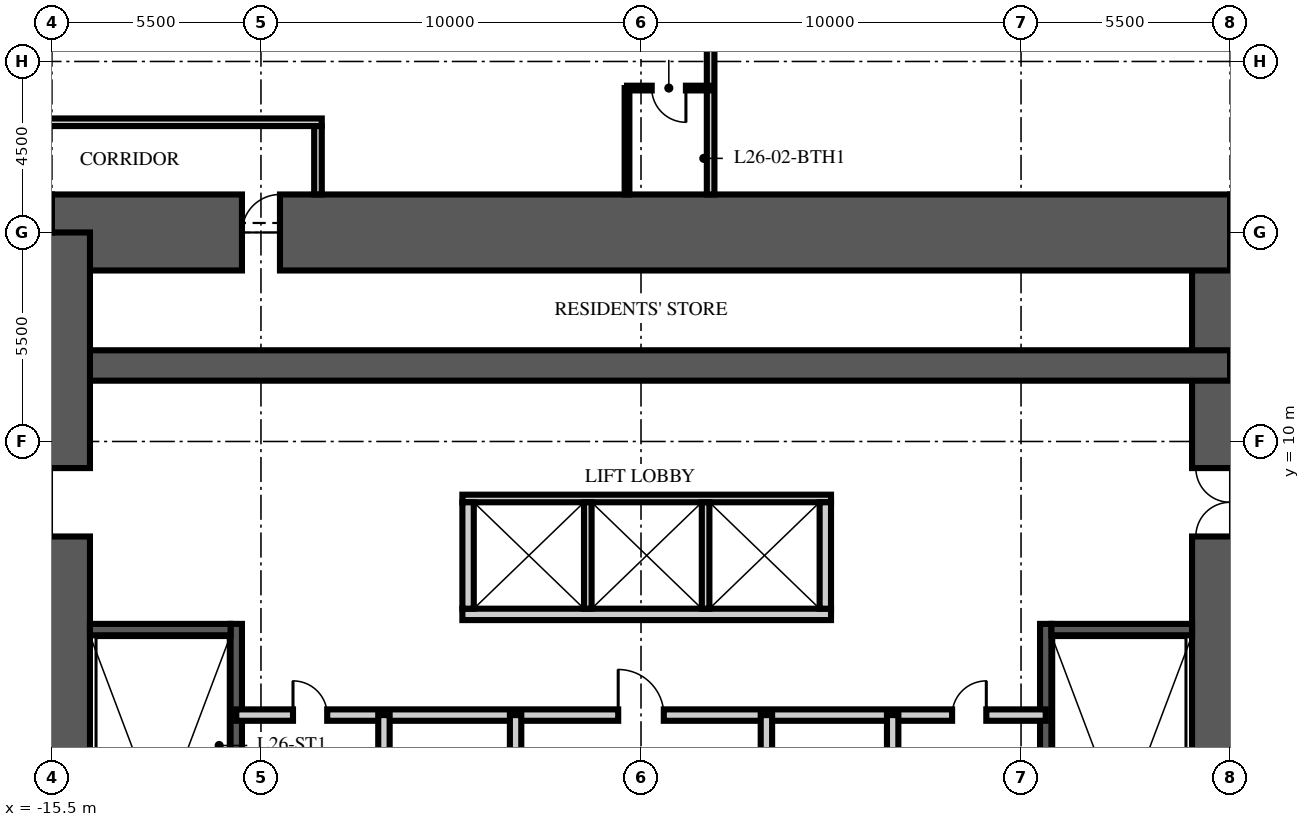
"""IFC4 building model, lengths in metres.
Left out: names, types, materials, properties, quantities, classifications, styles, units other than length and angle.
Written with IfcOpenShell. Run it as: python <this file> out.ifc"""

import sys

from ifc_helpers import new_model, si_unit, direction, frame, frame_2d, origin, place, context, subcontext, project, spatial, rectangle, extrude, element, fill, save


model = new_model("IFC4")
c1 = context("Model", 3, precision=1e-05, world=origin(), true_north=direction((0.0, 1.0)))
c2 = subcontext(c1, "Body", "Model", "MODEL_VIEW")
j1 = project(units=[si_unit("LENGTHUNIT", "METRE"), si_unit("PLANEANGLEUNIT", "RADIAN")], contexts=[c1])
p1 = place(None, origin())
s1 = spatial("IfcSite", under=j1, at=p1, CompositionType="ELEMENT")
p2 = place(p1, origin())
s2 = spatial("IfcBuilding", under=s1, at=p2, CompositionType="ELEMENT")
p3 = place(p2, frame((0.0, 0.0, 107.25)))
s3 = spatial("IfcBuildingStorey", under=s2, at=p3, CompositionType="ELEMENT", Elevation=107.25)
p4 = place(p3, frame((15.5, -15.5, -0.25), z_axis=(0.0, 0.0, 1.0), x_axis=(0.0, 1.0, 0.0)))
e1 = element("IfcWall", 1, at=p4, inside=s3, PredefinedType="SHEAR", context=c2, shape_type="SweptSolid", body=[
    extrude(rectangle(XDim=31.0, YDim=2.0, at=frame_2d((15.5, 0.0))), origin(), (0.0, 0.0, 1.0), 3.75),
])
p5 = place(p4, frame((6.5, 0.0, 0.25)))
e2 = element("IfcOpeningElement", 2, at=p5, cuts=e1, PredefinedType="OPENING", context=c2, shape_type="SweptSolid", body=[
    extrude(rectangle(XDim=1.2, YDim=2.1, at=frame_2d((0.6, 1.05))), frame((0.0, 1.01, 0.0), z_axis=(0.0, -1.0, 0.0), x_axis=(1.0, 0.0, 0.0)), (0.0, 0.0, 1.0), 2.02),
])
p6 = place(p4, frame((23.0, 0.0, 0.25)))
e3 = element("IfcOpeningElement", 3, at=p6, cuts=e1, PredefinedType="OPENING", context=c2, shape_type="SweptSolid", body=[
    extrude(rectangle(XDim=1.8, YDim=2.1, at=frame_2d((0.9, 1.05))), frame((0.0, 1.01, 0.0), z_axis=(0.0, -1.0, 0.0), x_axis=(1.0, 0.0, 0.0)), (0.0, 0.0, 1.0), 2.02),
])
p7 = place(p3, frame((-15.5, 15.5, -0.25), z_axis=(0.0, 0.0, 1.0), x_axis=(1.0, 0.0, 0.0)))
e4 = element("IfcWall", 4, at=p7, inside=s3, PredefinedType="SHEAR", context=c2, shape_type="SweptSolid", body=[
    extrude(rectangle(XDim=31.0, YDim=2.0, at=frame_2d((15.5, 0.0))), origin(), (0.0, 0.0, 1.0), 3.75),
])
p8 = place(p7, frame((5.0, 0.0, 0.25)))
e5 = element("IfcOpeningElement", 5, at=p8, cuts=e4, PredefinedType="OPENING", context=c2, shape_type="SweptSolid", body=[
    extrude(rectangle(XDim=1.0, YDim=2.1, at=frame_2d((0.5, 1.05))), frame((0.0, 1.01, 0.0), z_axis=(0.0, -1.0, 0.0), x_axis=(1.0, 0.0, 0.0)), (0.0, 0.0, 1.0), 2.02),
])
p9 = place(p3, frame((-15.5, 12.0, -0.25), z_axis=(0.0, 0.0, 1.0), x_axis=(1.0, 0.0, 0.0)))
e6 = element("IfcWall", 6, at=p9, inside=s3, PredefinedType="SHEAR", context=c2, shape_type="SweptSolid", body=[
    extrude(rectangle(XDim=31.0, YDim=0.8, at=frame_2d((15.5, 0.0))), origin(), (0.0, 0.0, 1.0), 3.75),
])
p10 = place(p3, frame((-15.5, -15.5, -0.25), z_axis=(0.0, 0.0, 1.0), x_axis=(0.0, 1.0, 0.0)))
e7 = element("IfcWall", 7, at=p10, inside=s3, PredefinedType="SHEAR", context=c2, shape_type="SweptSolid", body=[
    extrude(rectangle(XDim=31.0, YDim=2.0, at=frame_2d((15.5, 0.0))), origin(), (0.0, 0.0, 1.0), 3.75),
])
p11 = place(p10, frame((6.5, 0.0, 0.25)))
e8 = element("IfcOpeningElement", 8, at=p11, cuts=e7, PredefinedType="OPENING", context=c2, shape_type="SweptSolid", body=[
    extrude(rectangle(XDim=1.2, YDim=2.1, at=frame_2d((0.6, 1.05))), frame((0.0, 1.01, 0.0), z_axis=(0.0, -1.0, 0.0), x_axis=(1.0, 0.0, 0.0)), (0.0, 0.0, 1.0), 2.02),
])
p12 = place(p10, frame((23.0, 0.0, 0.25)))
e9 = element("IfcOpeningElement", 9, at=p12, cuts=e7, PredefinedType="OPENING", context=c2, shape_type="SweptSolid", body=[
    extrude(rectangle(XDim=1.8, YDim=2.1, at=frame_2d((0.9, 1.05))), frame((0.0, 1.01, 0.0), z_axis=(0.0, -1.0, 0.0), x_axis=(1.0, 0.0, 0.0)), (0.0, 0.0, 1.0), 2.02),
])
p13 = place(p3, frame((-10.65, -4.9, 0.0), z_axis=(0.0, 0.0, 1.0), x_axis=(0.0, 1.0, 0.0)))
e10 = element("IfcWall", 10, at=p13, inside=s3, PredefinedType="SOLIDWALL", context=c2, shape_type="SweptSolid", body=[
    extrude(rectangle(XDim=10.1, YDim=0.3, at=frame_2d((5.05, 0.0))), origin(), (0.0, 0.0, 1.0), 3.5),
])
p14 = place(p3, frame((-14.5, 5.05, 0.0), z_axis=(0.0, 0.0, 1.0), x_axis=(1.0, 0.0, 0.0)))
e11 = element("IfcWall", 11, at=p14, inside=s3, PredefinedType="SOLIDWALL", context=c2, shape_type="SweptSolid", body=[
    extrude(rectangle(XDim=3.7, YDim=0.3, at=frame_2d((1.85, 0.0))), origin(), (0.0, 0.0, 1.0), 3.5),
])
p15 = place(p3, frame((10.65, -4.9, 0.0), z_axis=(0.0, 0.0, 1.0), x_axis=(0.0, 1.0, 0.0)))
e12 = element("IfcWall", 12, at=p15, inside=s3, PredefinedType="SOLIDWALL", context=c2, shape_type="SweptSolid", body=[
    extrude(rectangle(XDim=10.1, YDim=0.3, at=frame_2d((5.05, 0.0))), origin(), (0.0, 0.0, 1.0), 3.5),
])
p16 = place(p3, frame((14.5, 5.05, 0.0), z_axis=(0.0, 0.0, 1.0), x_axis=(-1.0, 0.0, 0.0)))
e13 = element("IfcWall", 13, at=p16, inside=s3, PredefinedType="SOLIDWALL", context=c2, shape_type="SweptSolid", body=[
    extrude(rectangle(XDim=3.7, YDim=0.3, at=frame_2d((1.85, 0.0))), origin(), (0.0, 0.0, 1.0), 3.5),
])
p17 = place(p3, frame((-4.7, 5.45, 0.0), z_axis=(0.0, 0.0, 1.0), x_axis=(1.0, 0.0, 0.0)))
e14 = element("IfcWall", 14, at=p17, inside=s3, PredefinedType="PARTITIONING", context=c2, shape_type="SweptSolid", body=[
    extrude(rectangle(XDim=9.7, YDim=0.3, at=frame_2d((4.85, 0.0))), origin(), (0.0, 0.0, 1.0), 3.5),
])
p18 = place(p3, frame((-4.7, 8.5, 0.0), z_axis=(0.0, 0.0, 1.0), x_axis=(1.0, 0.0, 0.0)))
e15 = element("IfcWall", 15, at=p18, inside=s3, PredefinedType="PARTITIONING", context=c2, shape_type="SweptSolid", body=[
    extrude(rectangle(XDim=9.7, YDim=0.2, at=frame_2d((4.85, 0.0))), origin(), (0.0, 0.0, 1.0), 3.5),
])
for number, where, z_axis, x_axis in (
    (16, (-4.55, 5.6, 0.0), (0.0, 0.0, 1.0), (0.0, 1.0, 0.0)),
    (17, (4.85, 5.6, 0.0), (0.0, 0.0, 1.0), (0.0, 1.0, 0.0)),
):
    element("IfcWall", number, at=place(p3, frame(where, z_axis=z_axis, x_axis=x_axis)), inside=s3, PredefinedType="PARTITIONING", context=c2, shape_type="SweptSolid", body=[
        extrude(rectangle(XDim=2.8, YDim=0.3, at=frame_2d((1.4, 0.0))), origin(), (0.0, 0.0, 1.0), 3.5),
    ])
for number, where, z_axis, x_axis in (
    (18, (-1.4, 5.6, 0.0), (0.0, 0.0, 1.0), (0.0, 1.0, 0.0)),
    (19, (1.7, 5.6, 0.0), (0.0, 0.0, 1.0), (0.0, 1.0, 0.0)),
):
    element("IfcWall", number, at=place(p3, frame(where, z_axis=z_axis, x_axis=x_axis)), inside=s3, PredefinedType="PARTITIONING", context=c2, shape_type="SweptSolid", body=[
        extrude(rectangle(XDim=2.8, YDim=0.2, at=frame_2d((1.4, 0.0))), origin(), (0.0, 0.0, 1.0), 3.5),
    ])
p19 = place(p3, frame((-10.65, 2.8, 0.0), z_axis=(0.0, 0.0, 1.0), x_axis=(1.0, 0.0, 0.0)))
e20 = element("IfcWall", 20, at=p19, inside=s3, PredefinedType="PARTITIONING", context=c2, shape_type="SweptSolid", body=[
    extrude(rectangle(XDim=21.3, YDim=0.3, at=frame_2d((10.65, 0.0))), origin(), (0.0, 0.0, 1.0), 3.5),
])
p20 = place(p19, frame((10.05, 0.0, 0.0)))
e21 = element("IfcOpeningElement", 21, at=p20, cuts=e20, PredefinedType="OPENING", context=c2, shape_type="SweptSolid", body=[
    extrude(rectangle(XDim=1.2, YDim=2.1, at=frame_2d((0.6, 1.05))), frame((0.0, 0.16, 0.0), z_axis=(0.0, -1.0, 0.0), x_axis=(1.0, 0.0, 0.0)), (0.0, 0.0, 1.0), 0.32),
])
p21 = place(p19, frame((1.493, 0.0, 0.0)))
e22 = element("IfcOpeningElement", 22, at=p21, cuts=e20, PredefinedType="OPENING", context=c2, shape_type="SweptSolid", body=[
    extrude(rectangle(XDim=0.9, YDim=2.1, at=frame_2d((0.45, 1.05))), frame((0.0, 0.16, 0.0), z_axis=(0.0, -1.0, 0.0), x_axis=(1.0, 0.0, 0.0)), (0.0, 0.0, 1.0), 0.32),
])
p22 = place(p19, frame((18.836, 0.0, 0.0)))
e23 = element("IfcOpeningElement", 23, at=p22, cuts=e20, PredefinedType="OPENING", context=c2, shape_type="SweptSolid", body=[
    extrude(rectangle(XDim=0.9, YDim=2.1, at=frame_2d((0.45, 1.05))), frame((0.0, 0.16, 0.0), z_axis=(0.0, -1.0, 0.0), x_axis=(1.0, 0.0, 0.0)), (0.0, 0.0, 1.0), 0.32),
])
p23 = place(p3, frame((-3.3, -6.65, 0.0), z_axis=(0.0, 0.0, 1.0), x_axis=(0.0, 1.0, 0.0)))
e24 = element("IfcWall", 24, at=p23, inside=s3, PredefinedType="PARTITIONING", context=c2, shape_type="SweptSolid", body=[
    extrude(rectangle(XDim=9.45, YDim=0.3, at=frame_2d((4.725, 0.0))), origin(), (0.0, 0.0, 1.0), 3.5),
])
p24 = place(p23, frame((4.275, 0.0, 0.0)))
e25 = element("IfcOpeningElement", 25, at=p24, cuts=e24, PredefinedType="OPENING", context=c2, shape_type="SweptSolid", body=[
    extrude(rectangle(XDim=0.9, YDim=2.1, at=frame_2d((0.45, 1.05))), frame((0.0, 0.16, 0.0), z_axis=(0.0, -1.0, 0.0), x_axis=(1.0, 0.0, 0.0)), (0.0, 0.0, 1.0), 0.32),
])
p25 = place(p3, frame((3.3, -6.65, 0.0), z_axis=(0.0, 0.0, 1.0), x_axis=(0.0, 1.0, 0.0)))
e26 = element("IfcWall", 26, at=p25, inside=s3, PredefinedType="PARTITIONING", context=c2, shape_type="SweptSolid", body=[
    extrude(rectangle(XDim=9.45, YDim=0.3, at=frame_2d((4.725, 0.0))), origin(), (0.0, 0.0, 1.0), 3.5),
])
p26 = place(p25, frame((4.275, 0.0, 0.0)))
e27 = element("IfcOpeningElement", 27, at=p26, cuts=e26, PredefinedType="OPENING", context=c2, shape_type="SweptSolid", body=[
    extrude(rectangle(XDim=0.9, YDim=2.1, at=frame_2d((0.45, 1.05))), frame((0.0, 0.16, 0.0), z_axis=(0.0, -1.0, 0.0), x_axis=(1.0, 0.0, 0.0)), (0.0, 0.0, 1.0), 0.32),
])
for number, where, z_axis, x_axis in (
    (28, (-6.764, -6.65, 0.0), (0.0, 0.0, 1.0), (0.0, 1.0, 0.0)),
    (29, (6.622, -6.65, 0.0), (0.0, 0.0, 1.0), (0.0, 1.0, 0.0)),
):
    element("IfcWall", number, at=place(p3, frame(where, z_axis=z_axis, x_axis=x_axis)), inside=s3, PredefinedType="PARTITIONING", context=c2, shape_type="SweptSolid", body=[
        extrude(rectangle(XDim=9.45, YDim=0.3, at=frame_2d((4.725, 0.0))), origin(), (0.0, 0.0, 1.0), 3.5),
    ])
p27 = place(p3, frame((-18.5, 18.4, 0.0), z_axis=(0.0, 0.0, 1.0), x_axis=(1.0, 0.0, 0.0)))
e30 = element("IfcWall", 30, at=p27, inside=s3, PredefinedType="PARTITIONING", context=c2, shape_type="SweptSolid", body=[
    extrude(rectangle(XDim=10.1, YDim=0.2, at=frame_2d((5.05, 0.0))), origin(), (0.0, 0.0, 1.0), 2.3),
])
p28 = place(p3, frame((-8.5, 18.3, 0.0), z_axis=(0.0, 0.0, 1.0), x_axis=(0.0, -1.0, 0.0)))
e31 = element("IfcWall", 31, at=p28, inside=s3, PredefinedType="PARTITIONING", context=c2, shape_type="SweptSolid", body=[
    extrude(rectangle(XDim=1.8, YDim=0.2, at=frame_2d((0.9, 0.0))), origin(), (0.0, 0.0, 1.0), 3.5),
])
p29 = place(p3, frame((1.832, 16.5, 0.0), z_axis=(0.0, 0.0, 1.0), x_axis=(0.0, 1.0, 0.0)))
e32 = element("IfcWall", 32, at=p29, inside=s3, PredefinedType="PARTITIONING", context=c2, shape_type="SweptSolid", body=[
    extrude(rectangle(XDim=12.65, YDim=0.2, at=frame_2d((6.325, 0.0))), origin(), (0.0, 0.0, 1.0), 2.81),
])
p30 = place(p3, frame((1.832, 19.3, 0.0), z_axis=(0.0, 0.0, 1.0), x_axis=(-1.0, 0.0, 0.0)))
e33 = element("IfcWall", 33, at=p30, inside=s3, PredefinedType="PARTITIONING", context=c2, shape_type="SweptSolid", body=[
    extrude(rectangle(XDim=2.2, YDim=0.125, at=frame_2d((1.1, 0.0))), origin(), (0.0, 0.0, 1.0), 2.7),
])
p31 = place(p30, frame((0.65, 0.0, 0.0)))
e34 = element("IfcOpeningElement", 34, at=p31, cuts=e33, PredefinedType="OPENING", context=c2, shape_type="SweptSolid", body=[
    extrude(rectangle(XDim=0.9, YDim=2.1, at=frame_2d((0.45, 1.05))), frame((0.0, 0.073, 0.0), z_axis=(0.0, -1.0, 0.0), x_axis=(1.0, 0.0, 0.0)), (0.0, 0.0, 1.0), 0.145),
])
p32 = place(p3, frame((-0.368, 16.5, 0.0), z_axis=(0.0, 0.0, 1.0), x_axis=(0.0, 1.0, 0.0)))
e35 = element("IfcWall", 35, at=p32, inside=s3, PredefinedType="PARTITIONING", context=c2, shape_type="SweptSolid", body=[
    extrude(rectangle(XDim=2.8, YDim=0.125, at=frame_2d((1.4, 0.0))), origin(), (0.0, 0.0, 1.0), 3.5),
])
p33 = place(p12, origin())
e36 = element("IfcDoor", 36, at=p33, inside=s3, OperationType="DOUBLE_DOOR_SINGLE_SWING", PredefinedType="DOOR", context=c2, shape_type="SweptSolid", body=[
    extrude(rectangle(XDim=1.8, YDim=2.1, at=frame_2d((0.9, 1.05))), frame((0.0, 0.025, 0.0), z_axis=(0.0, -1.0, 0.0), x_axis=(1.0, 0.0, 0.0)), (0.0, 0.0, 1.0), 0.05),
])
fill(e9, e36)
p34 = place(p6, origin())
e37 = element("IfcDoor", 37, at=p34, inside=s3, OperationType="DOUBLE_DOOR_SINGLE_SWING", PredefinedType="DOOR", context=c2, shape_type="SweptSolid", body=[
    extrude(rectangle(XDim=1.8, YDim=2.1, at=frame_2d((0.9, 1.05))), frame((0.0, 0.025, 0.0), z_axis=(0.0, -1.0, 0.0), x_axis=(1.0, 0.0, 0.0)), (0.0, 0.0, 1.0), 0.05),
])
fill(e3, e37)
p35 = place(p20, origin())
e38 = element("IfcDoor", 38, at=p35, inside=s3, OperationType="SINGLE_SWING_LEFT", PredefinedType="DOOR", context=c2, shape_type="SweptSolid", body=[
    extrude(rectangle(XDim=1.2, YDim=2.1, at=frame_2d((0.6, 1.05))), frame((0.0, 0.025, 0.0), z_axis=(0.0, -1.0, 0.0), x_axis=(1.0, 0.0, 0.0)), (0.0, 0.0, 1.0), 0.05),
])
fill(e21, e38)
p36 = place(p21, origin())
e39 = element("IfcDoor", 39, at=p36, inside=s3, OperationType="SINGLE_SWING_LEFT", PredefinedType="DOOR", context=c2, shape_type="SweptSolid", body=[
    extrude(rectangle(XDim=0.9, YDim=2.1, at=frame_2d((0.45, 1.05))), frame((0.0, 0.025, 0.0), z_axis=(0.0, -1.0, 0.0), x_axis=(1.0, 0.0, 0.0)), (0.0, 0.0, 1.0), 0.05),
])
fill(e22, e39)
p37 = place(p22, origin())
e40 = element("IfcDoor", 40, at=p37, inside=s3, OperationType="SINGLE_SWING_RIGHT", PredefinedType="DOOR", context=c2, shape_type="SweptSolid", body=[
    extrude(rectangle(XDim=0.9, YDim=2.1, at=frame_2d((0.45, 1.05))), frame((0.0, 0.025, 0.0), z_axis=(0.0, -1.0, 0.0), x_axis=(1.0, 0.0, 0.0)), (0.0, 0.0, 1.0), 0.05),
])
fill(e23, e40)
p38 = place(p8, origin())
e41 = element("IfcDoor", 41, at=p38, inside=s3, OperationType="SINGLE_SWING_RIGHT", PredefinedType="DOOR", context=c2, shape_type="SweptSolid", body=[
    extrude(rectangle(XDim=1.0, YDim=2.1, at=frame_2d((0.5, 1.05))), frame((0.0, 0.025, 0.0), z_axis=(0.0, -1.0, 0.0), x_axis=(1.0, 0.0, 0.0)), (0.0, 0.0, 1.0), 0.05),
])
fill(e5, e41)
p39 = place(p31, origin())
e42 = element("IfcDoor", 42, at=p39, inside=s3, OperationType="SINGLE_SWING_LEFT", PredefinedType="DOOR", context=c2, shape_type="SweptSolid", body=[
    extrude(rectangle(XDim=0.9, YDim=2.1, at=frame_2d((0.45, 1.05))), frame((0.0, 0.025, 0.0), z_axis=(0.0, -1.0, 0.0), x_axis=(1.0, 0.0, 0.0)), (0.0, 0.0, 1.0), 0.05),
])
fill(e34, e42)
save(model, sys.argv[1])
